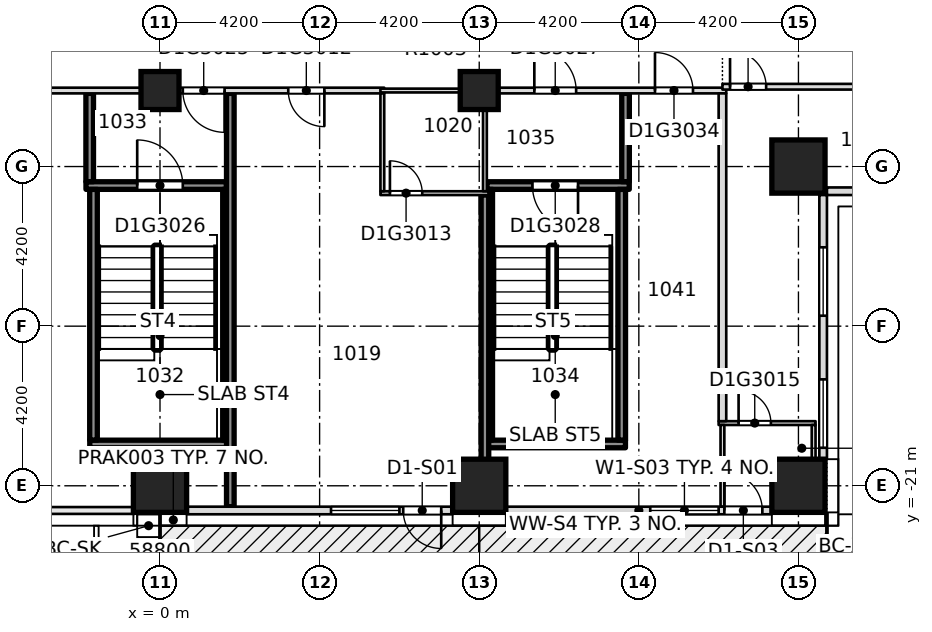
"""IFC4 building model, lengths in metres.
Left out: names, types, materials, properties, quantities, classifications, styles, units other than length and angle.
Written with IfcOpenShell. Run it as: python <this file> out.ifc"""

import sys

from ifc_helpers import new_model, si_unit, direction, frame, frame_2d, origin, origin_2d, place, context, subcontext, project, spatial, rectangle, extrude, element, fill, save


model = new_model("IFC4")
c1 = context("Model", 3, precision=1e-05, world=origin(), true_north=direction((0.0, 1.0)))
c2 = subcontext(c1, "Body", "Model", "MODEL_VIEW")
j1 = project(units=[si_unit("LENGTHUNIT", "METRE"), si_unit("PLANEANGLEUNIT", "RADIAN")], contexts=[c1])
p1 = place(None, origin())
s1 = spatial("IfcSite", under=j1, at=p1, CompositionType="ELEMENT")
p2 = place(p1, origin())
s2 = spatial("IfcBuilding", under=s1, at=p2, CompositionType="ELEMENT")
p3 = place(p2, frame((0.0, 0.0, 48.3)))
s3 = spatial("IfcBuildingStorey", under=s2, at=p3, CompositionType="ELEMENT", Elevation=48.3)
for number, where, z_axis, x_axis in (
    (1, (0.0, -21.0, -0.32), (0.0, 0.0, 1.0), (1.0, 0.0, 0.0)),
    (2, (8.4, -21.0, -0.32), (0.0, 0.0, 1.0), (1.0, 0.0, 0.0)),
    (3, (16.8, -21.0, -0.32), (0.0, 0.0, 1.0), (1.0, 0.0, 0.0)),
    (4, (16.8, -12.6, -0.32), (0.0, 0.0, 1.0), (1.0, 0.0, 0.0)),
):
    element("IfcColumn", number, at=place(p3, frame(where, z_axis=z_axis, x_axis=x_axis)), inside=s3, PredefinedType="COLUMN", context=c2, shape_type="SweptSolid", body=[
        extrude(rectangle(XDim=1.4, YDim=1.4, at=origin_2d()), origin(), (0.0, 0.0, 1.0), 3.45),
    ])
for number, where, z_axis, x_axis in (
    (5, (0.0, -10.6, -0.32), (0.0, 0.0, 1.0), (1.0, 0.0, 0.0)),
    (6, (8.4, -10.6, -0.32), (0.0, 0.0, 1.0), (1.0, 0.0, 0.0)),
):
    element("IfcColumn", number, at=place(p3, frame(where, z_axis=z_axis, x_axis=x_axis)), inside=s3, PredefinedType="COLUMN", context=c2, shape_type="SweptSolid", body=[
        extrude(rectangle(XDim=1.0, YDim=1.0, at=origin_2d()), origin(), (0.0, 0.0, 1.0), 3.45),
    ])
p4 = place(p3, frame((-1.848, -19.9, 0.0), z_axis=(0.0, 0.0, 1.0), x_axis=(1.0, 0.0, 0.0)))
e7 = element("IfcWall", 7, at=p4, inside=s3, PredefinedType="SOLIDWALL", context=c2, shape_type="SweptSolid", body=[
    extrude(rectangle(XDim=3.696, YDim=0.2, at=frame_2d((1.848, 0.0))), origin(), (0.0, 0.0, 1.0), 3.13),
])
p5 = place(p3, frame((8.552, -19.9, 0.0), z_axis=(0.0, 0.0, 1.0), x_axis=(1.0, 0.0, 0.0)))
e8 = element("IfcWall", 8, at=p5, inside=s3, PredefinedType="SOLIDWALL", context=c2, shape_type="SweptSolid", body=[
    extrude(rectangle(XDim=3.696, YDim=0.2, at=frame_2d((1.848, 0.0))), origin(), (0.0, 0.0, 1.0), 3.13),
])
p6 = place(p3, frame((14.7, -19.35, 0.0), z_axis=(0.0, 0.0, 1.0), x_axis=(1.0, 0.0, 0.0)))
e9 = element("IfcWall", 9, at=p6, inside=s3, PredefinedType="PARTITIONING", context=c2, shape_type="SweptSolid", body=[
    extrude(rectangle(XDim=2.55, YDim=0.1, at=frame_2d((1.275, 0.0))), origin(), (0.0, 0.0, 1.0), 3.13),
])
p7 = place(p6, frame((0.525, 0.0, 0.0)))
e10 = element("IfcOpeningElement", 10, at=p7, cuts=e9, PredefinedType="OPENING", context=c2, shape_type="SweptSolid", body=[
    extrude(rectangle(XDim=0.85, YDim=2.1, at=frame_2d((0.425, 1.05))), frame((0.0, 0.06, 0.0), z_axis=(0.0, -1.0, 0.0), x_axis=(1.0, 0.0, 0.0)), (0.0, 0.0, 1.0), 0.12),
])
p8 = place(p3, frame((5.8, -13.3, 0.0), z_axis=(0.0, 0.0, 1.0), x_axis=(1.0, 0.0, 0.0)))
e11 = element("IfcWall", 11, at=p8, inside=s3, PredefinedType="PARTITIONING", context=c2, shape_type="SweptSolid", body=[
    extrude(rectangle(XDim=2.85, YDim=0.1, at=frame_2d((1.425, 0.0))), origin(), (0.0, 0.0, 1.0), 3.13),
])
p9 = place(p8, frame((0.25, 0.0, 0.0)))
e12 = element("IfcOpeningElement", 12, at=p9, cuts=e11, PredefinedType="OPENING", context=c2, shape_type="SweptSolid", body=[
    extrude(rectangle(XDim=0.85, YDim=2.1, at=frame_2d((0.425, 1.05))), frame((0.0, 0.06, 0.0), z_axis=(0.0, -1.0, 0.0), x_axis=(1.0, 0.0, 0.0)), (0.0, 0.0, 1.0), 0.12),
])
p10 = place(p3, frame((-1.948, -13.1, 0.0), z_axis=(0.0, 0.0, 1.0), x_axis=(1.0, 0.0, 0.0)))
e13 = element("IfcWall", 13, at=p10, inside=s3, PredefinedType="SOLIDWALL", context=c2, shape_type="SweptSolid", body=[
    extrude(rectangle(XDim=3.696, YDim=0.2, at=frame_2d((1.848, 0.0))), origin(), (0.0, 0.0, 1.0), 3.13),
])
p11 = place(p10, frame((1.348, 0.0, 0.0)))
e14 = element("IfcOpeningElement", 14, at=p11, cuts=e13, PredefinedType="OPENING", context=c2, shape_type="SweptSolid", body=[
    extrude(rectangle(XDim=1.2, YDim=2.1, at=frame_2d((0.6, 1.05))), frame((0.0, 0.11, 0.0), z_axis=(0.0, -1.0, 0.0), x_axis=(1.0, 0.0, 0.0)), (0.0, 0.0, 1.0), 0.22),
])
p12 = place(p3, frame((8.602, -13.1, 0.0), z_axis=(0.0, 0.0, 1.0), x_axis=(1.0, 0.0, 0.0)))
e15 = element("IfcWall", 15, at=p12, inside=s3, PredefinedType="SOLIDWALL", context=c2, shape_type="SweptSolid", body=[
    extrude(rectangle(XDim=3.746, YDim=0.2, at=frame_2d((1.873, 0.0))), origin(), (0.0, 0.0, 1.0), 3.13),
])
p13 = place(p12, frame((1.198, 0.0, 0.0)))
e16 = element("IfcOpeningElement", 16, at=p13, cuts=e15, PredefinedType="OPENING", context=c2, shape_type="SweptSolid", body=[
    extrude(rectangle(XDim=1.2, YDim=2.1, at=frame_2d((0.6, 1.05))), frame((0.0, 0.11, 0.0), z_axis=(0.0, -1.0, 0.0), x_axis=(1.0, 0.0, 0.0)), (0.0, 0.0, 1.0), 0.22),
])
p14 = place(p3, frame((-14.9, -10.6, 0.0), z_axis=(0.0, 0.0, 1.0), x_axis=(1.0, 0.0, 0.0)))
e17 = element("IfcWall", 17, at=p14, inside=s3, PredefinedType="PARTITIONING", context=c2, shape_type="SweptSolid", body=[
    extrude(rectangle(XDim=20.8, YDim=0.15, at=frame_2d((10.4, 0.0))), origin(), (0.0, 0.0, 1.0), 3.13),
])
p15 = place(p14, frame((9.225, 0.0, 0.0)))
e18 = element("IfcOpeningElement", 18, at=p15, cuts=e17, PredefinedType="OPENING", context=c2, shape_type="SweptSolid", body=[
    extrude(rectangle(XDim=0.95, YDim=2.1, at=frame_2d((0.475, 1.05))), frame((0.0, 0.085, 0.0), z_axis=(0.0, -1.0, 0.0), x_axis=(1.0, 0.0, 0.0)), (0.0, 0.0, 1.0), 0.17),
])
p16 = place(p14, frame((18.275, 0.0, 0.0)))
e19 = element("IfcOpeningElement", 19, at=p16, cuts=e17, PredefinedType="OPENING", context=c2, shape_type="SweptSolid", body=[
    extrude(rectangle(XDim=0.95, YDim=2.1, at=frame_2d((0.475, 1.05))), frame((0.0, 0.085, 0.0), z_axis=(0.0, -1.0, 0.0), x_axis=(1.0, 0.0, 0.0)), (0.0, 0.0, 1.0), 0.17),
])
p17 = place(p14, frame((3.95, 0.0, 0.0)))
e20 = element("IfcOpeningElement", 20, at=p17, cuts=e17, PredefinedType="OPENING", context=c2, shape_type="SweptSolid", body=[
    extrude(rectangle(XDim=1.1, YDim=2.1, at=frame_2d((0.55, 1.05))), frame((0.0, 0.085, 0.0), z_axis=(0.0, -1.0, 0.0), x_axis=(1.0, 0.0, 0.0)), (0.0, 0.0, 1.0), 0.17),
])
p18 = place(p14, frame((15.5, 0.0, 0.0)))
e21 = element("IfcOpeningElement", 21, at=p18, cuts=e17, PredefinedType="OPENING", context=c2, shape_type="SweptSolid", body=[
    extrude(rectangle(XDim=1.1, YDim=2.1, at=frame_2d((0.55, 1.05))), frame((0.0, 0.085, 0.0), z_axis=(0.0, -1.0, 0.0), x_axis=(1.0, 0.0, 0.0)), (0.0, 0.0, 1.0), 0.17),
])
p19 = place(p14, frame((0.875, 0.0, 0.0)))
e22 = element("IfcOpeningElement", 22, at=p19, cuts=e17, PredefinedType="OPENING", context=c2, shape_type="SweptSolid", body=[
    extrude(rectangle(XDim=1.0, YDim=2.1, at=frame_2d((0.5, 1.05))), frame((0.0, 0.085, 0.0), z_axis=(0.0, -1.0, 0.0), x_axis=(1.0, 0.0, 0.0)), (0.0, 0.0, 1.0), 0.17),
])
p20 = place(p3, frame((5.8, -10.6, 0.0), z_axis=(0.0, 0.0, 1.0), x_axis=(1.0, 0.0, 0.0)))
e23 = element("IfcWall", 23, at=p20, inside=s3, PredefinedType="PARTITIONING", context=c2, shape_type="SweptSolid", body=[
    extrude(rectangle(XDim=2.8, YDim=0.1, at=frame_2d((1.4, 0.0))), origin(), (0.0, 0.0, 1.0), 3.13),
])
p21 = place(p3, frame((8.5, -10.6, 0.0), z_axis=(0.0, 0.0, 1.0), x_axis=(1.0, 0.0, 0.0)))
e24 = element("IfcWall", 24, at=p21, inside=s3, PredefinedType="PARTITIONING", context=c2, shape_type="SweptSolid", body=[
    extrude(rectangle(XDim=6.4, YDim=0.15, at=frame_2d((3.2, 0.0))), origin(), (0.0, 0.0, 1.0), 3.13),
])
p22 = place(p21, frame((1.35, 0.0, 0.0)))
e25 = element("IfcOpeningElement", 25, at=p22, cuts=e24, PredefinedType="OPENING", context=c2, shape_type="SweptSolid", body=[
    extrude(rectangle(XDim=1.1, YDim=2.1, at=frame_2d((0.55, 1.05))), frame((0.0, 0.085, 0.0), z_axis=(0.0, -1.0, 0.0), x_axis=(1.0, 0.0, 0.0)), (0.0, 0.0, 1.0), 0.17),
])
p23 = place(p21, frame((4.525, 0.0, 0.0)))
e26 = element("IfcOpeningElement", 26, at=p23, cuts=e24, PredefinedType="OPENING", context=c2, shape_type="SweptSolid", body=[
    extrude(rectangle(XDim=1.0, YDim=2.1, at=frame_2d((0.5, 1.05))), frame((0.0, 0.085, 0.0), z_axis=(0.0, -1.0, 0.0), x_axis=(1.0, 0.0, 0.0)), (0.0, 0.0, 1.0), 0.17),
])
p24 = place(p3, frame((14.8, -10.5, 0.0), z_axis=(0.0, 0.0, 1.0), x_axis=(1.0, 0.0, 0.0)))
e27 = element("IfcWall", 27, at=p24, inside=s3, PredefinedType="PARTITIONING", context=c2, shape_type="SweptSolid", body=[
    extrude(rectangle(XDim=10.95, YDim=0.15, at=frame_2d((5.475, 0.0))), origin(), (0.0, 0.0, 1.0), 3.13),
])
p25 = place(p24, frame((0.2, 0.0, 0.0)))
e28 = element("IfcOpeningElement", 28, at=p25, cuts=e27, PredefinedType="OPENING", context=c2, shape_type="SweptSolid", body=[
    extrude(rectangle(XDim=0.95, YDim=2.1, at=frame_2d((0.475, 1.05))), frame((0.0, 0.085, 0.0), z_axis=(0.0, -1.0, 0.0), x_axis=(1.0, 0.0, 0.0)), (0.0, 0.0, 1.0), 0.17),
])
p26 = place(p3, frame((-1.85, -12.998, 0.0), z_axis=(0.0, 0.0, 1.0), x_axis=(0.0, 1.0, 0.0)))
e29 = element("IfcWall", 29, at=p26, inside=s3, PredefinedType="SOLIDWALL", context=c2, shape_type="SweptSolid", body=[
    extrude(rectangle(XDim=2.323, YDim=0.2, at=frame_2d((1.162, 0.0))), origin(), (0.0, 0.0, 1.0), 3.13),
])
for number, where, z_axis, x_axis in (
    (30, (-1.75, -19.798, 0.0), (0.0, 0.0, 1.0), (0.0, 1.0, 0.0)),
    (31, (1.75, -19.798, 0.0), (0.0, 0.0, 1.0), (0.0, 1.0, 0.0)),
):
    element("IfcWall", number, at=place(p3, frame(where, z_axis=z_axis, x_axis=x_axis)), inside=s3, PredefinedType="SOLIDWALL", context=c2, shape_type="SweptSolid", body=[
        extrude(rectangle(XDim=6.596, YDim=0.2, at=frame_2d((3.298, 0.0))), origin(), (0.0, 0.0, 1.0), 3.13),
    ])
for number, where, z_axis, x_axis in (
    (32, (5.85, -13.25, 0.0), (0.0, 0.0, 1.0), (0.0, 1.0, 0.0)),
    (33, (8.55, -13.25, 0.0), (0.0, 0.0, 1.0), (0.0, 1.0, 0.0)),
):
    element("IfcWall", number, at=place(p3, frame(where, z_axis=z_axis, x_axis=x_axis)), inside=s3, PredefinedType="PARTITIONING", context=c2, shape_type="SweptSolid", body=[
        extrude(rectangle(XDim=2.575, YDim=0.1, at=frame_2d((1.288, 0.0))), origin(), (0.0, 0.0, 1.0), 3.13),
    ])
for number, where, z_axis, x_axis in (
    (34, (8.65, -19.798, 0.0), (0.0, 0.0, 1.0), (0.0, 1.0, 0.0)),
    (35, (12.15, -19.798, 0.0), (0.0, 0.0, 1.0), (0.0, 1.0, 0.0)),
):
    element("IfcWall", number, at=place(p3, frame(where, z_axis=z_axis, x_axis=x_axis)), inside=s3, PredefinedType="SOLIDWALL", context=c2, shape_type="SweptSolid", body=[
        extrude(rectangle(XDim=6.596, YDim=0.2, at=frame_2d((3.298, 0.0))), origin(), (0.0, 0.0, 1.0), 3.13),
    ])
p27 = place(p3, frame((12.25, -12.998, 0.0), z_axis=(0.0, 0.0, 1.0), x_axis=(0.0, 1.0, 0.0)))
e36 = element("IfcWall", 36, at=p27, inside=s3, PredefinedType="SOLIDWALL", context=c2, shape_type="SweptSolid", body=[
    extrude(rectangle(XDim=2.323, YDim=0.2, at=frame_2d((1.162, 0.0))), origin(), (0.0, 0.0, 1.0), 3.13),
])
p28 = place(p3, frame((14.8, -21.55, 0.0), z_axis=(0.0, 0.0, 1.0), x_axis=(0.0, 1.0, 0.0)))
e37 = element("IfcWall", 37, at=p28, inside=s3, PredefinedType="PARTITIONING", context=c2, shape_type="SweptSolid", body=[
    extrude(rectangle(XDim=2.15, YDim=0.1, at=frame_2d((1.075, 0.0))), origin(), (0.0, 0.0, 1.0), 3.13),
])
p29 = place(p3, frame((14.8, -19.3, 0.0), z_axis=(0.0, 0.0, 1.0), x_axis=(0.0, 1.0, 0.0)))
e38 = element("IfcWall", 38, at=p29, inside=s3, PredefinedType="PARTITIONING", context=c2, shape_type="SweptSolid", body=[
    extrude(rectangle(XDim=8.625, YDim=0.2, at=frame_2d((4.312, 0.0))), origin(), (0.0, 0.0, 1.0), 3.13),
])
p30 = place(p3, frame((17.2, -21.55, 0.0), z_axis=(0.0, 0.0, 1.0), x_axis=(0.0, 1.0, 0.0)))
e39 = element("IfcWall", 39, at=p30, inside=s3, PredefinedType="PARTITIONING", context=c2, shape_type="SweptSolid", body=[
    extrude(rectangle(XDim=2.15, YDim=0.1, at=frame_2d((1.075, 0.0))), origin(), (0.0, 0.0, 1.0), 3.13),
])
p31 = place(p3, frame((0.7, -21.65, 0.0), z_axis=(0.0, 0.0, 1.0), x_axis=(1.0, 0.0, 0.0)))
e40 = element("IfcWall", 40, at=p31, inside=s3, PredefinedType="STANDARD", context=c2, shape_type="SweptSolid", body=[
    extrude(rectangle(XDim=7.0, YDim=0.2, at=frame_2d((3.5, 0.0))), origin(), (0.0, 0.0, 1.0), 3.13),
])
p32 = place(p31, frame((3.8, 0.0, 0.2)))
e41 = element("IfcOpeningElement", 41, at=p32, cuts=e40, PredefinedType="OPENING", context=c2, shape_type="SweptSolid", body=[
    extrude(rectangle(XDim=1.8, YDim=2.65, at=frame_2d((0.9, 1.325))), frame((0.0, 0.11, 0.0), z_axis=(0.0, -1.0, 0.0), x_axis=(1.0, 0.0, 0.0)), (0.0, 0.0, 1.0), 0.22),
])
p33 = place(p31, frame((5.7, 0.0, 0.0)))
e42 = element("IfcOpeningElement", 42, at=p33, cuts=e40, PredefinedType="OPENING", context=c2, shape_type="SweptSolid", body=[
    extrude(rectangle(XDim=1.0, YDim=2.4, at=frame_2d((0.5, 1.2))), frame((0.0, 0.11, 0.0), z_axis=(0.0, -1.0, 0.0), x_axis=(1.0, 0.0, 0.0)), (0.0, 0.0, 1.0), 0.22),
])
p34 = place(p3, frame((9.1, -21.65, 0.0), z_axis=(0.0, 0.0, 1.0), x_axis=(1.0, 0.0, 0.0)))
e43 = element("IfcWall", 43, at=p34, inside=s3, PredefinedType="STANDARD", context=c2, shape_type="SweptSolid", body=[
    extrude(rectangle(XDim=7.0, YDim=0.2, at=frame_2d((3.5, 0.0))), origin(), (0.0, 0.0, 1.0), 3.13),
])
p35 = place(p34, frame((3.8, 0.0, 0.2)))
e44 = element("IfcOpeningElement", 44, at=p35, cuts=e43, PredefinedType="OPENING", context=c2, shape_type="SweptSolid", body=[
    extrude(rectangle(XDim=1.8, YDim=2.65, at=frame_2d((0.9, 1.325))), frame((0.0, 0.11, 0.0), z_axis=(0.0, -1.0, 0.0), x_axis=(1.0, 0.0, 0.0)), (0.0, 0.0, 1.0), 0.22),
])
p36 = place(p34, frame((5.75, 0.0, 0.0)))
e45 = element("IfcOpeningElement", 45, at=p36, cuts=e43, PredefinedType="OPENING", context=c2, shape_type="SweptSolid", body=[
    extrude(rectangle(XDim=1.0, YDim=2.4, at=frame_2d((0.5, 1.2))), frame((0.0, 0.11, 0.0), z_axis=(0.0, -1.0, 0.0), x_axis=(1.0, 0.0, 0.0)), (0.0, 0.0, 1.0), 0.22),
])
p37 = place(p3, frame((17.45, -20.3, 0.0), z_axis=(0.0, 0.0, 1.0), x_axis=(0.0, 1.0, 0.0)))
e46 = element("IfcWall", 46, at=p37, inside=s3, PredefinedType="STANDARD", context=c2, shape_type="SweptSolid", body=[
    extrude(rectangle(XDim=6.95, YDim=0.2, at=frame_2d((3.475, 0.0))), origin(), (0.0, 0.0, 1.0), 3.13),
])
p38 = place(p37, frame((0.3, 0.0, 0.2)))
e47 = element("IfcOpeningElement", 47, at=p38, cuts=e46, PredefinedType="OPENING", context=c2, shape_type="SweptSolid", body=[
    extrude(rectangle(XDim=1.8, YDim=2.65, at=frame_2d((0.9, 1.325))), frame((0.0, 0.11, 0.0), z_axis=(0.0, -1.0, 0.0), x_axis=(1.0, 0.0, 0.0)), (0.0, 0.0, 1.0), 0.22),
])
p39 = place(p37, frame((3.775, 0.0, 0.2)))
e48 = element("IfcOpeningElement", 48, at=p39, cuts=e46, PredefinedType="OPENING", context=c2, shape_type="SweptSolid", body=[
    extrude(rectangle(XDim=1.8, YDim=2.65, at=frame_2d((0.9, 1.325))), frame((0.0, 0.11, 0.0), z_axis=(0.0, -1.0, 0.0), x_axis=(1.0, 0.0, 0.0)), (0.0, 0.0, 1.0), 0.22),
])
p40 = place(p3, frame((17.55, -13.25, 0.0), z_axis=(0.0, 0.0, 1.0), x_axis=(1.0, 0.0, 0.0)))
e49 = element("IfcWall", 49, at=p40, inside=s3, PredefinedType="STANDARD", context=c2, shape_type="SweptSolid", body=[
    extrude(rectangle(XDim=6.95, YDim=0.2, at=frame_2d((3.475, 0.0))), origin(), (0.0, 0.0, 1.0), 3.13),
])
p41 = place(p3, frame((1.85, -21.55, 0.0), z_axis=(0.0, 0.0, 1.0), x_axis=(0.0, 1.0, 0.0)))
e50 = element("IfcWall", 50, at=p41, inside=s3, PredefinedType="SOLIDWALL", context=c2, shape_type="SweptSolid", body=[
    extrude(rectangle(XDim=10.875, YDim=0.2, at=frame_2d((5.438, 0.0))), origin(), (0.0, 0.0, 1.0), 3.13),
])
p42 = place(p3, frame((8.55, -21.55, 0.0), z_axis=(0.0, 0.0, 1.0), x_axis=(0.0, 1.0, 0.0)))
e51 = element("IfcWall", 51, at=p42, inside=s3, PredefinedType="SOLIDWALL", context=c2, shape_type="SweptSolid", body=[
    extrude(rectangle(XDim=8.2, YDim=0.2, at=frame_2d((4.1, 0.0))), origin(), (0.0, 0.0, 1.0), 3.13),
])
p43 = place(p16, origin())
e52 = element("IfcDoor", 52, at=p43, inside=s3, OperationType="SINGLE_SWING_LEFT", PredefinedType="DOOR", context=c2, shape_type="SweptSolid", body=[
    extrude(rectangle(XDim=0.95, YDim=2.1, at=frame_2d((0.475, 1.05))), frame((0.0, 0.025, 0.0), z_axis=(0.0, -1.0, 0.0), x_axis=(1.0, 0.0, 0.0)), (0.0, 0.0, 1.0), 0.05),
])
fill(e19, e52)
p44 = place(p9, origin())
e53 = element("IfcDoor", 53, at=p44, inside=s3, OperationType="SINGLE_SWING_LEFT", PredefinedType="DOOR", context=c2, shape_type="SweptSolid", body=[
    extrude(rectangle(XDim=0.85, YDim=2.1, at=frame_2d((0.425, 1.05))), frame((0.0, 0.025, 0.0), z_axis=(0.0, -1.0, 0.0), x_axis=(1.0, 0.0, 0.0)), (0.0, 0.0, 1.0), 0.05),
])
fill(e12, e53)
p45 = place(p25, origin())
e54 = element("IfcDoor", 54, at=p45, inside=s3, OperationType="SINGLE_SWING_RIGHT", PredefinedType="DOOR", context=c2, shape_type="SweptSolid", body=[
    extrude(rectangle(XDim=0.95, YDim=2.1, at=frame_2d((0.475, 1.05))), frame((0.0, 0.025, 0.0), z_axis=(0.0, -1.0, 0.0), x_axis=(1.0, 0.0, 0.0)), (0.0, 0.0, 1.0), 0.05),
])
fill(e28, e54)
p46 = place(p7, origin())
e55 = element("IfcDoor", 55, at=p46, inside=s3, OperationType="SINGLE_SWING_RIGHT", PredefinedType="DOOR", context=c2, shape_type="SweptSolid", body=[
    extrude(rectangle(XDim=0.85, YDim=2.1, at=frame_2d((0.425, 1.05))), frame((0.0, 0.025, 0.0), z_axis=(0.0, -1.0, 0.0), x_axis=(1.0, 0.0, 0.0)), (0.0, 0.0, 1.0), 0.05),
])
fill(e10, e55)
p47 = place(p18, origin())
e56 = element("IfcDoor", 56, at=p47, inside=s3, OperationType="SINGLE_SWING_LEFT", PredefinedType="DOOR", context=c2, shape_type="SweptSolid", body=[
    extrude(rectangle(XDim=1.1, YDim=2.1, at=frame_2d((0.55, 1.05))), frame((0.0, 0.025, 0.0), z_axis=(0.0, -1.0, 0.0), x_axis=(1.0, 0.0, 0.0)), (0.0, 0.0, 1.0), 0.05),
])
fill(e21, e56)
p48 = place(p11, origin())
e57 = element("IfcDoor", 57, at=p48, inside=s3, OperationType="SINGLE_SWING_RIGHT", PredefinedType="DOOR", context=c2, shape_type="SweptSolid", body=[
    extrude(rectangle(XDim=1.2, YDim=2.1, at=frame_2d((0.6, 1.05))), frame((0.0, 0.025, 0.0), z_axis=(0.0, -1.0, 0.0), x_axis=(1.0, 0.0, 0.0)), (0.0, 0.0, 1.0), 0.05),
])
fill(e14, e57)
p49 = place(p22, origin())
e58 = element("IfcDoor", 58, at=p49, inside=s3, OperationType="SINGLE_SWING_RIGHT", PredefinedType="DOOR", context=c2, shape_type="SweptSolid", body=[
    extrude(rectangle(XDim=1.1, YDim=2.1, at=frame_2d((0.55, 1.05))), frame((0.0, 0.025, 0.0), z_axis=(0.0, -1.0, 0.0), x_axis=(1.0, 0.0, 0.0)), (0.0, 0.0, 1.0), 0.05),
])
fill(e25, e58)
p50 = place(p13, origin())
e59 = element("IfcDoor", 59, at=p50, inside=s3, OperationType="SINGLE_SWING_RIGHT", PredefinedType="DOOR", context=c2, shape_type="SweptSolid", body=[
    extrude(rectangle(XDim=1.2, YDim=2.1, at=frame_2d((0.6, 1.05))), frame((0.0, 0.025, 0.0), z_axis=(0.0, -1.0, 0.0), x_axis=(1.0, 0.0, 0.0)), (0.0, 0.0, 1.0), 0.05),
])
fill(e16, e59)
p51 = place(p23, origin())
e60 = element("IfcDoor", 60, at=p51, inside=s3, OperationType="SINGLE_SWING_RIGHT", PredefinedType="DOOR", context=c2, shape_type="SweptSolid", body=[
    extrude(rectangle(XDim=1.0, YDim=2.1, at=frame_2d((0.5, 1.05))), frame((0.0, 0.025, 0.0), z_axis=(0.0, -1.0, 0.0), x_axis=(1.0, 0.0, 0.0)), (0.0, 0.0, 1.0), 0.05),
])
fill(e26, e60)
p52 = place(p32, origin())
e61 = element("IfcWindow", 61, at=p52, inside=s3, PartitioningType="SINGLE_PANEL", PredefinedType="WINDOW", context=c2, shape_type="SweptSolid", body=[
    extrude(rectangle(XDim=1.8, YDim=2.65, at=frame_2d((0.9, 1.325))), frame((0.0, 0.03, 0.0), z_axis=(0.0, -1.0, 0.0), x_axis=(1.0, 0.0, 0.0)), (0.0, 0.0, 1.0), 0.06),
])
fill(e41, e61)
p53 = place(p33, origin())
e62 = element("IfcDoor", 62, at=p53, inside=s3, OperationType="SINGLE_SWING_LEFT", PredefinedType="DOOR", context=c2, shape_type="SweptSolid", body=[
    extrude(rectangle(XDim=1.0, YDim=2.4, at=frame_2d((0.5, 1.2))), frame((0.0, 0.025, 0.0), z_axis=(0.0, -1.0, 0.0), x_axis=(1.0, 0.0, 0.0)), (0.0, 0.0, 1.0), 0.05),
])
fill(e42, e62)
p54 = place(p35, origin())
e63 = element("IfcWindow", 63, at=p54, inside=s3, PartitioningType="SINGLE_PANEL", PredefinedType="WINDOW", context=c2, shape_type="SweptSolid", body=[
    extrude(rectangle(XDim=1.8, YDim=2.65, at=frame_2d((0.9, 1.325))), frame((0.0, 0.03, 0.0), z_axis=(0.0, -1.0, 0.0), x_axis=(1.0, 0.0, 0.0)), (0.0, 0.0, 1.0), 0.06),
])
fill(e44, e63)
p55 = place(p36, origin())
e64 = element("IfcDoor", 64, at=p55, inside=s3, OperationType="SINGLE_SWING_LEFT", PredefinedType="DOOR", context=c2, shape_type="SweptSolid", body=[
    extrude(rectangle(XDim=1.0, YDim=2.4, at=frame_2d((0.5, 1.2))), frame((0.0, 0.025, 0.0), z_axis=(0.0, -1.0, 0.0), x_axis=(1.0, 0.0, 0.0)), (0.0, 0.0, 1.0), 0.05),
])
fill(e45, e64)
p56 = place(p38, origin())
e65 = element("IfcWindow", 65, at=p56, inside=s3, PartitioningType="SINGLE_PANEL", PredefinedType="WINDOW", context=c2, shape_type="SweptSolid", body=[
    extrude(rectangle(XDim=1.8, YDim=2.65, at=frame_2d((0.9, 1.325))), frame((0.0, 0.03, 0.0), z_axis=(0.0, -1.0, 0.0), x_axis=(1.0, 0.0, 0.0)), (0.0, 0.0, 1.0), 0.06),
])
fill(e47, e65)
p57 = place(p39, origin())
e66 = element("IfcWindow", 66, at=p57, inside=s3, PartitioningType="SINGLE_PANEL", PredefinedType="WINDOW", context=c2, shape_type="SweptSolid", body=[
    extrude(rectangle(XDim=1.8, YDim=2.65, at=frame_2d((0.9, 1.325))), frame((0.0, 0.03, 0.0), z_axis=(0.0, -1.0, 0.0), x_axis=(1.0, 0.0, 0.0)), (0.0, 0.0, 1.0), 0.06),
])
fill(e48, e66)
save(model, sys.argv[1])
